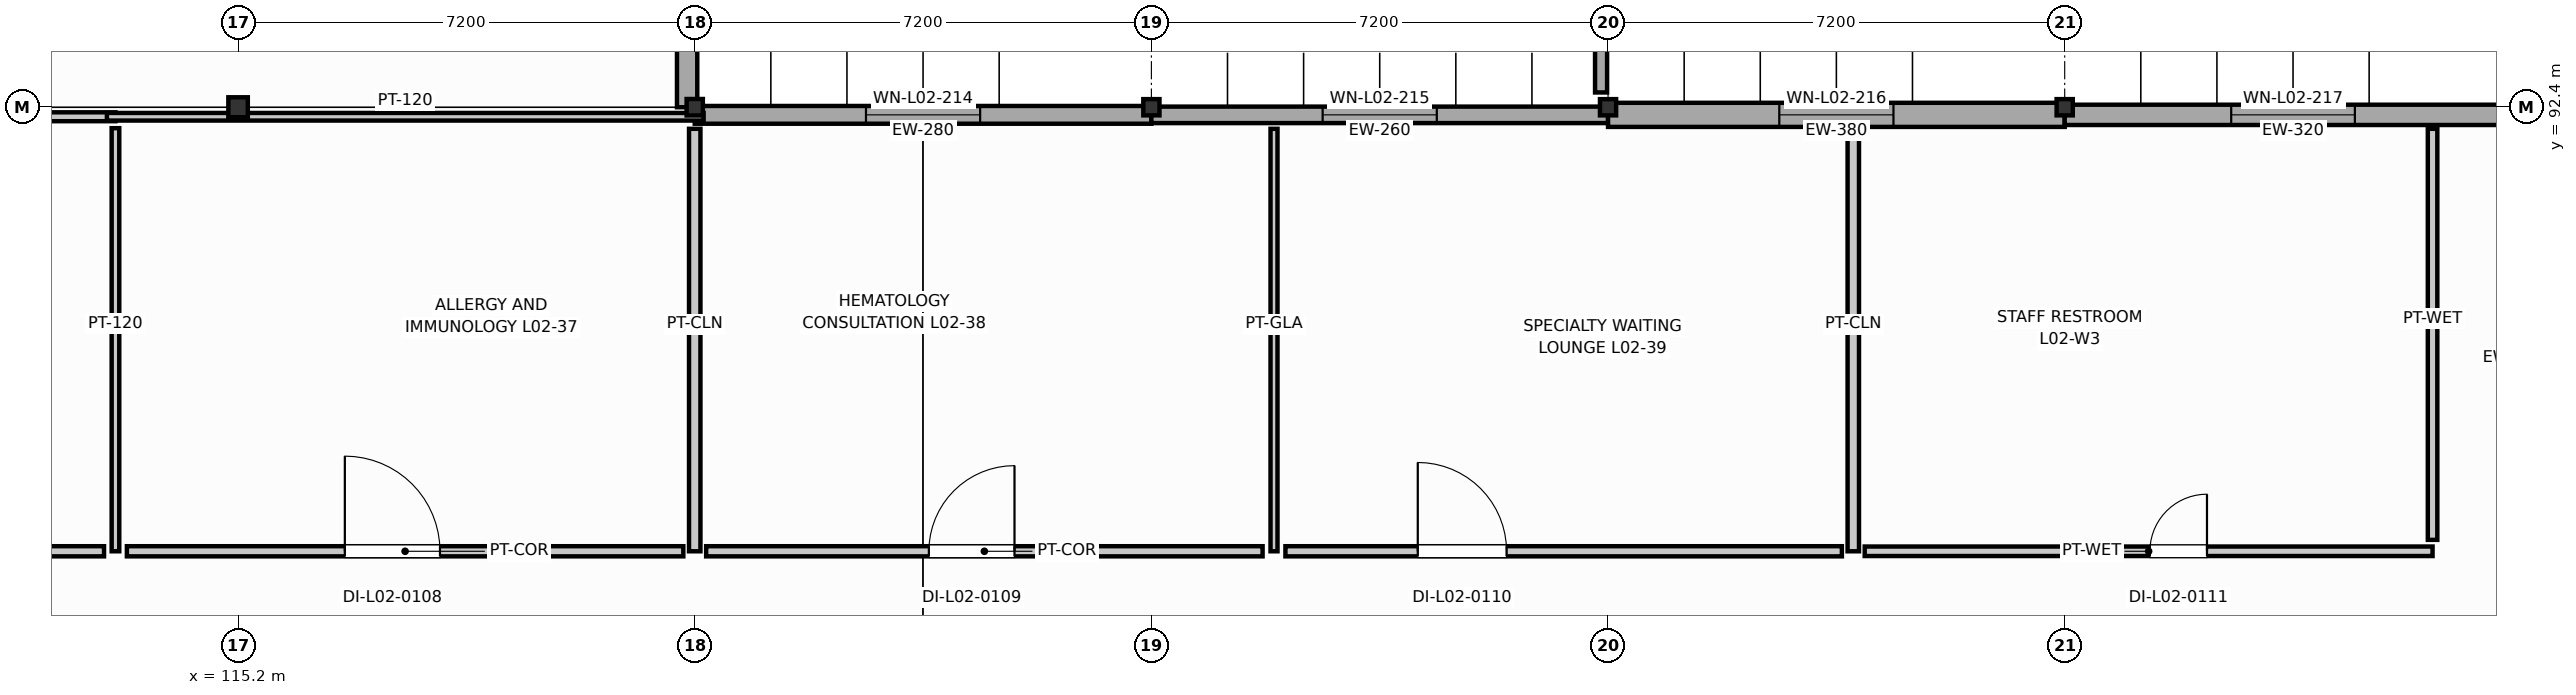
"""IFC4 building model, lengths in metres.
Left out: names, types, materials, properties, quantities, classifications, styles, units other than length and angle.
Written with IfcOpenShell. Run it as: python <this file> out.ifc"""

import sys

from ifc_helpers import new_model, si_unit, direction, frame, frame_2d, origin, origin_2d, place, context, subcontext, project, spatial, rectangle, i_section, extrude, element, fill, save


model = new_model("IFC4")
c1 = context("Model", 3, precision=1e-05, world=origin(), true_north=direction((0.0, 1.0)))
c2 = subcontext(c1, "Body", "Model", "MODEL_VIEW")
j1 = project(units=[si_unit("LENGTHUNIT", "METRE"), si_unit("PLANEANGLEUNIT", "RADIAN")], contexts=[c1])
p1 = place(None, origin())
s1 = spatial("IfcSite", under=j1, at=p1, CompositionType="ELEMENT")
p2 = place(p1, origin())
s2 = spatial("IfcBuilding", under=s1, at=p2, CompositionType="ELEMENT")
p3 = place(p2, frame((0.0, 0.0, 9.0)))
s3 = spatial("IfcBuildingStorey", under=s2, at=p3, CompositionType="ELEMENT", Elevation=9.0)
p4 = place(p3, frame((115.2, 92.4, 0.0), z_axis=(0.0, 0.0, 1.0), x_axis=(1.0, 0.0, 0.0)))
e1 = element("IfcColumn", 1, at=p4, inside=s3, PredefinedType="COLUMN", context=c2, shape_type="SweptSolid", body=[
    extrude(i_section(OverallWidth=0.307, OverallDepth=0.314, WebThickness=0.012, FlangeThickness=0.019, FilletRadius=0.016, at=origin_2d()), origin(), (0.0, 0.0, 1.0), 4.2),
])
p5 = place(p3, frame((122.4, 92.4, 0.0), z_axis=(0.0, 0.0, 1.0), x_axis=(1.0, 0.0, 0.0)))
e2 = element("IfcColumn", 2, at=p5, inside=s3, PredefinedType="COLUMN", context=c2, shape_type="SweptSolid", body=[
    extrude(i_section(OverallWidth=0.256, OverallDepth=0.26, WebThickness=0.011, FlangeThickness=0.017, FilletRadius=0.013, at=origin_2d()), origin(), (0.0, 0.0, 1.0), 4.2),
])
for number, where, z_axis, x_axis in (
    (3, (129.6, 92.4, 0.0), (0.0, 0.0, 1.0), (1.0, 0.0, 0.0)),
    (4, (136.8, 92.4, 0.0), (0.0, 0.0, 1.0), (1.0, 0.0, 0.0)),
    (5, (144.0, 92.4, 0.0), (0.0, 0.0, 1.0), (1.0, 0.0, 0.0)),
):
    element("IfcColumn", number, at=place(p3, frame(where, z_axis=z_axis, x_axis=x_axis)), inside=s3, PredefinedType="COLUMN", context=c2, shape_type="SweptSolid", body=[
        extrude(i_section(OverallWidth=0.255, OverallDepth=0.256, WebThickness=0.01, FlangeThickness=0.016, FilletRadius=0.013, at=origin_2d()), origin(), (0.0, 0.0, 1.0), 4.2),
    ])
p6 = place(p3, frame((122.28, 92.4, 0.0), z_axis=(0.0, 0.0, 1.0), x_axis=(0.0, 1.0, 0.0)))
e6 = element("IfcWall", 6, at=p6, inside=s3, PredefinedType="SOLIDWALL", context=c2, shape_type="SweptSolid", body=[
    extrude(rectangle(XDim=8.4, YDim=0.32, at=frame_2d((4.2, 0.0))), origin(), (0.0, 0.0, 1.0), 3.091),
])
p7 = place(p6, frame((3.375, 0.0, 0.95)))
e7 = element("IfcOpeningElement", 7, at=p7, cuts=e6, PredefinedType="OPENING", context=c2, shape_type="SweptSolid", body=[
    extrude(rectangle(XDim=1.65, YDim=1.75, at=frame_2d((0.825, 0.875))), frame((0.0, 0.17, 0.0), z_axis=(0.0, -1.0, 0.0), x_axis=(1.0, 0.0, 0.0)), (0.0, 0.0, 1.0), 0.34),
])
p8 = place(p3, frame((122.4, 92.28, 0.0), z_axis=(0.0, 0.0, 1.0), x_axis=(1.0, 0.0, 0.0)))
e8 = element("IfcWall", 8, at=p8, inside=s3, PredefinedType="SOLIDWALL", context=c2, shape_type="SweptSolid", body=[
    extrude(rectangle(XDim=7.2, YDim=0.28, at=frame_2d((3.6, 0.0))), origin(), (0.0, 0.0, 1.0), 3.249),
])
p9 = place(p8, frame((2.7, 0.0, 0.95)))
e9 = element("IfcOpeningElement", 9, at=p9, cuts=e8, PredefinedType="OPENING", context=c2, shape_type="SweptSolid", body=[
    extrude(rectangle(XDim=1.8, YDim=1.35, at=frame_2d((0.9, 0.675))), frame((0.0, 0.15, 0.0), z_axis=(0.0, -1.0, 0.0), x_axis=(1.0, 0.0, 0.0)), (0.0, 0.0, 1.0), 0.3),
])
p10 = place(p3, frame((129.6, 92.28, 0.0), z_axis=(0.0, 0.0, 1.0), x_axis=(1.0, 0.0, 0.0)))
e10 = element("IfcWall", 10, at=p10, inside=s3, PredefinedType="SOLIDWALL", context=c2, shape_type="SweptSolid", body=[
    extrude(rectangle(XDim=7.2, YDim=0.26, at=frame_2d((3.6, 0.0))), origin(), (0.0, 0.0, 1.0), 3.249),
])
p11 = place(p10, frame((2.7, 0.0, 0.95)))
e11 = element("IfcOpeningElement", 11, at=p11, cuts=e10, PredefinedType="OPENING", context=c2, shape_type="SweptSolid", body=[
    extrude(rectangle(XDim=1.8, YDim=1.55, at=frame_2d((0.9, 0.775))), frame((0.0, 0.14, 0.0), z_axis=(0.0, -1.0, 0.0), x_axis=(1.0, 0.0, 0.0)), (0.0, 0.0, 1.0), 0.28),
])
p12 = place(p3, frame((136.8, 92.28, 0.0), z_axis=(0.0, 0.0, 1.0), x_axis=(1.0, 0.0, 0.0)))
e12 = element("IfcWall", 12, at=p12, inside=s3, PredefinedType="SOLIDWALL", context=c2, shape_type="SweptSolid", body=[
    extrude(rectangle(XDim=7.2, YDim=0.38, at=frame_2d((3.6, 0.0))), origin(), (0.0, 0.0, 1.0), 3.249),
])
p13 = place(p12, frame((2.7, 0.0, 0.95)))
e13 = element("IfcOpeningElement", 13, at=p13, cuts=e12, PredefinedType="OPENING", context=c2, shape_type="SweptSolid", body=[
    extrude(rectangle(XDim=1.8, YDim=1.75, at=frame_2d((0.9, 0.875))), frame((0.0, 0.2, 0.0), z_axis=(0.0, -1.0, 0.0), x_axis=(1.0, 0.0, 0.0)), (0.0, 0.0, 1.0), 0.4),
])
p14 = place(p3, frame((144.0, 92.28, 0.0), z_axis=(0.0, 0.0, 1.0), x_axis=(1.0, 0.0, 0.0)))
e14 = element("IfcWall", 14, at=p14, inside=s3, PredefinedType="SOLIDWALL", context=c2, shape_type="SweptSolid", body=[
    extrude(rectangle(XDim=7.2, YDim=0.32, at=frame_2d((3.6, 0.0))), origin(), (0.0, 0.0, 1.0), 3.254),
])
p15 = place(p14, frame((2.625, 0.0, 0.95)))
e15 = element("IfcOpeningElement", 15, at=p15, cuts=e14, PredefinedType="OPENING", context=c2, shape_type="SweptSolid", body=[
    extrude(rectangle(XDim=1.95, YDim=1.15, at=frame_2d((0.975, 0.575))), frame((0.0, 0.17, 0.0), z_axis=(0.0, -1.0, 0.0), x_axis=(1.0, 0.0, 0.0)), (0.0, 0.0, 1.0), 0.34),
])
p16 = place(p3, frame((136.69, 108.98, 0.0), z_axis=(0.0, 0.0, 1.0), x_axis=(0.0, -1.0, 0.0)))
e16 = element("IfcWall", 16, at=p16, inside=s3, PredefinedType="PARAPET", context=c2, shape_type="SweptSolid", body=[
    extrude(rectangle(XDim=16.347, YDim=0.19, at=frame_2d((8.173, 0.0))), origin(), (0.0, 0.0, 1.0), 1.15),
])
p17 = place(p3, frame((103.998, 92.25, 0.0), z_axis=(0.0, 0.0, 1.0), x_axis=(1.0, 0.0, 0.0)))
e17 = element("IfcWall", 17, at=p17, inside=s3, PredefinedType="PARTITIONING", context=c2, shape_type="SweptSolid", body=[
    extrude(rectangle(XDim=9.268, YDim=0.14, at=frame_2d((4.634, 0.0))), origin(), (0.0, 0.0, 1.0), 3.175),
])
p18 = place(p3, frame((113.267, 92.07, 0.0), z_axis=(0.0, 0.0, 1.0), x_axis=(0.0, -1.0, 0.0)))
e18 = element("IfcWall", 18, at=p18, inside=s3, PredefinedType="PARTITIONING", context=c2, shape_type="SweptSolid", body=[
    extrude(rectangle(XDim=6.67, YDim=0.12, at=frame_2d((3.335, 0.0))), origin(), (0.0, 0.0, 1.0), 3.945),
])
p19 = place(p3, frame((113.087, 85.4, 0.0), z_axis=(0.0, 0.0, 1.0), x_axis=(-1.0, 0.0, 0.0)))
e19 = element("IfcWall", 19, at=p19, inside=s3, PredefinedType="PARTITIONING", context=c2, shape_type="SweptSolid", body=[
    extrude(rectangle(XDim=8.773, YDim=0.16, at=frame_2d((4.387, 0.0))), origin(), (0.0, 0.0, 1.0), 3.175),
])
p20 = place(p19, frame((3.012, 0.0, 0.0)))
e20 = element("IfcOpeningElement", 20, at=p20, cuts=e19, PredefinedType="OPENING", context=c2, shape_type="SweptSolid", body=[
    extrude(rectangle(XDim=1.15, YDim=2.15, at=frame_2d((0.575, 1.075))), frame((0.0, 0.09, 0.0), z_axis=(0.0, -1.0, 0.0), x_axis=(1.0, 0.0, 0.0)), (0.0, 0.0, 1.0), 0.18),
])
p21 = place(p3, frame((113.132, 92.25, 0.0), z_axis=(0.0, 0.0, 1.0), x_axis=(1.0, 0.0, 0.0)))
e21 = element("IfcWall", 21, at=p21, inside=s3, PredefinedType="PARTITIONING", context=c2, shape_type="SweptSolid", body=[
    extrude(rectangle(XDim=9.408, YDim=0.12, at=frame_2d((4.704, 0.0))), origin(), (0.0, 0.0, 1.0), 3.094),
])
p22 = place(p3, frame((122.4, 92.06, 0.0), z_axis=(0.0, 0.0, 1.0), x_axis=(0.0, -1.0, 0.0)))
e22 = element("IfcWall", 22, at=p22, inside=s3, PredefinedType="PARTITIONING", context=c2, shape_type="SweptSolid", body=[
    extrude(rectangle(XDim=6.66, YDim=0.18, at=frame_2d((3.33, 0.0))), origin(), (0.0, 0.0, 1.0), 3.535),
])
p23 = place(p3, frame((122.22, 85.4, 0.0), z_axis=(0.0, 0.0, 1.0), x_axis=(-1.0, 0.0, 0.0)))
e23 = element("IfcWall", 23, at=p23, inside=s3, PredefinedType="PARTITIONING", context=c2, shape_type="SweptSolid", body=[
    extrude(rectangle(XDim=8.773, YDim=0.16, at=frame_2d((4.387, 0.0))), origin(), (0.0, 0.0, 1.0), 3.408),
])
p24 = place(p23, frame((3.837, 0.0, 0.0)))
e24 = element("IfcOpeningElement", 24, at=p24, cuts=e23, PredefinedType="OPENING", context=c2, shape_type="SweptSolid", body=[
    extrude(rectangle(XDim=1.5, YDim=2.2, at=frame_2d((0.75, 1.1))), frame((0.0, 0.09, 0.0), z_axis=(0.0, -1.0, 0.0), x_axis=(1.0, 0.0, 0.0)), (0.0, 0.0, 1.0), 0.18),
])
p25 = place(p3, frame((131.533, 92.06, 0.0), z_axis=(0.0, 0.0, 1.0), x_axis=(0.0, -1.0, 0.0)))
e25 = element("IfcWall", 25, at=p25, inside=s3, PredefinedType="MOVABLE", context=c2, shape_type="SweptSolid", body=[
    extrude(rectangle(XDim=6.66, YDim=0.11, at=frame_2d((3.33, 0.0))), origin(), (0.0, 0.0, 1.0), 3.945),
])
p26 = place(p3, frame((131.353, 85.4, 0.0), z_axis=(0.0, 0.0, 1.0), x_axis=(-1.0, 0.0, 0.0)))
e26 = element("IfcWall", 26, at=p26, inside=s3, PredefinedType="PARTITIONING", context=c2, shape_type="SweptSolid", body=[
    extrude(rectangle(XDim=8.773, YDim=0.16, at=frame_2d((4.387, 0.0))), origin(), (0.0, 0.0, 1.0), 3.328),
])
p27 = place(p26, frame((3.912, 0.0, 0.0)))
e27 = element("IfcOpeningElement", 27, at=p27, cuts=e26, PredefinedType="OPENING", context=c2, shape_type="SweptSolid", body=[
    extrude(rectangle(XDim=1.35, YDim=2.15, at=frame_2d((0.675, 1.075))), frame((0.0, 0.09, 0.0), z_axis=(0.0, -1.0, 0.0), x_axis=(1.0, 0.0, 0.0)), (0.0, 0.0, 1.0), 0.18),
])
p28 = place(p3, frame((140.667, 92.06, 0.0), z_axis=(0.0, 0.0, 1.0), x_axis=(0.0, -1.0, 0.0)))
e28 = element("IfcWall", 28, at=p28, inside=s3, PredefinedType="PARTITIONING", context=c2, shape_type="SweptSolid", body=[
    extrude(rectangle(XDim=6.66, YDim=0.18, at=frame_2d((3.33, 0.0))), origin(), (0.0, 0.0, 1.0), 3.945),
])
p29 = place(p3, frame((140.487, 85.4, 0.0), z_axis=(0.0, 0.0, 1.0), x_axis=(-1.0, 0.0, 0.0)))
e29 = element("IfcWall", 29, at=p29, inside=s3, PredefinedType="PARTITIONING", context=c2, shape_type="SweptSolid", body=[
    extrude(rectangle(XDim=8.773, YDim=0.16, at=frame_2d((4.387, 0.0))), origin(), (0.0, 0.0, 1.0), 3.408),
])
p30 = place(p29, frame((5.287, 0.0, 0.0)))
e30 = element("IfcOpeningElement", 30, at=p30, cuts=e29, PredefinedType="OPENING", context=c2, shape_type="SweptSolid", body=[
    extrude(rectangle(XDim=1.4, YDim=2.2, at=frame_2d((0.7, 1.1))), frame((0.0, 0.09, 0.0), z_axis=(0.0, -1.0, 0.0), x_axis=(1.0, 0.0, 0.0)), (0.0, 0.0, 1.0), 0.18),
])
p31 = place(p3, frame((149.8, 85.4, 0.0), z_axis=(0.0, 0.0, 1.0), x_axis=(-1.0, 0.0, 0.0)))
e31 = element("IfcWall", 31, at=p31, inside=s3, PredefinedType="PLUMBINGWALL", context=c2, shape_type="SweptSolid", body=[
    extrude(rectangle(XDim=8.953, YDim=0.15, at=frame_2d((4.477, 0.0))), origin(), (0.0, 0.0, 1.0), 3.252),
])
p32 = place(p31, frame((3.557, 0.0, 0.0)))
e32 = element("IfcOpeningElement", 32, at=p32, cuts=e31, PredefinedType="OPENING", context=c2, shape_type="SweptSolid", body=[
    extrude(rectangle(XDim=0.9, YDim=2.1, at=frame_2d((0.45, 1.05))), frame((0.0, 0.085, 0.0), z_axis=(0.0, -1.0, 0.0), x_axis=(1.0, 0.0, 0.0)), (0.0, 0.0, 1.0), 0.17),
])
p33 = place(p3, frame((149.8, 92.06, 0.0), z_axis=(0.0, 0.0, 1.0), x_axis=(0.0, -1.0, 0.0)))
e33 = element("IfcWall", 33, at=p33, inside=s3, PredefinedType="PLUMBINGWALL", context=c2, shape_type="SweptSolid", body=[
    extrude(rectangle(XDim=6.48, YDim=0.15, at=frame_2d((3.24, 0.0))), origin(), (0.0, 0.0, 1.0), 3.945),
])
p34 = place(p9, origin())
e34 = element("IfcWindow", 34, at=p34, inside=s3, PartitioningType="SINGLE_PANEL", PredefinedType="WINDOW", context=c2, shape_type="SweptSolid", body=[
    extrude(rectangle(XDim=1.8, YDim=1.35, at=frame_2d((0.9, 0.675))), frame((0.0, 0.03, 0.0), z_axis=(0.0, -1.0, 0.0), x_axis=(1.0, 0.0, 0.0)), (0.0, 0.0, 1.0), 0.06),
])
fill(e9, e34)
p35 = place(p11, origin())
e35 = element("IfcWindow", 35, at=p35, inside=s3, PartitioningType="SINGLE_PANEL", PredefinedType="WINDOW", context=c2, shape_type="SweptSolid", body=[
    extrude(rectangle(XDim=1.8, YDim=1.55, at=frame_2d((0.9, 0.775))), frame((0.0, 0.03, 0.0), z_axis=(0.0, -1.0, 0.0), x_axis=(1.0, 0.0, 0.0)), (0.0, 0.0, 1.0), 0.06),
])
fill(e11, e35)
p36 = place(p13, origin())
e36 = element("IfcWindow", 36, at=p36, inside=s3, PartitioningType="SINGLE_PANEL", PredefinedType="WINDOW", context=c2, shape_type="SweptSolid", body=[
    extrude(rectangle(XDim=1.8, YDim=1.75, at=frame_2d((0.9, 0.875))), frame((0.0, 0.03, 0.0), z_axis=(0.0, -1.0, 0.0), x_axis=(1.0, 0.0, 0.0)), (0.0, 0.0, 1.0), 0.06),
])
fill(e13, e36)
p37 = place(p15, origin())
e37 = element("IfcWindow", 37, at=p37, inside=s3, PartitioningType="SINGLE_PANEL", PredefinedType="WINDOW", context=c2, shape_type="SweptSolid", body=[
    extrude(rectangle(XDim=1.95, YDim=1.15, at=frame_2d((0.975, 0.575))), frame((0.0, 0.03, 0.0), z_axis=(0.0, -1.0, 0.0), x_axis=(1.0, 0.0, 0.0)), (0.0, 0.0, 1.0), 0.06),
])
fill(e15, e37)
p38 = place(p24, frame((1.5, 0.0, 0.0), z_axis=(0.0, 0.0, 1.0), x_axis=(-1.0, 0.0, 0.0)))
e38 = element("IfcDoor", 38, at=p38, inside=s3, OperationType="SINGLE_SWING_LEFT", PredefinedType="DOOR", context=c2, shape_type="SweptSolid", body=[
    extrude(rectangle(XDim=1.5, YDim=2.2, at=frame_2d((0.75, 1.1))), frame((0.0, 0.025, 0.0), z_axis=(0.0, -1.0, 0.0), x_axis=(1.0, 0.0, 0.0)), (0.0, 0.0, 1.0), 0.05),
])
fill(e24, e38)
p39 = place(p27, frame((1.35, 0.0, 0.0), z_axis=(0.0, 0.0, 1.0), x_axis=(-1.0, 0.0, 0.0)))
e39 = element("IfcDoor", 39, at=p39, inside=s3, OperationType="SINGLE_SWING_RIGHT", PredefinedType="DOOR", context=c2, shape_type="SweptSolid", body=[
    extrude(rectangle(XDim=1.35, YDim=2.15, at=frame_2d((0.675, 1.075))), frame((0.0, 0.025, 0.0), z_axis=(0.0, -1.0, 0.0), x_axis=(1.0, 0.0, 0.0)), (0.0, 0.0, 1.0), 0.05),
])
fill(e27, e39)
p40 = place(p30, frame((1.4, 0.0, 0.0), z_axis=(0.0, 0.0, 1.0), x_axis=(-1.0, 0.0, 0.0)))
e40 = element("IfcDoor", 40, at=p40, inside=s3, OperationType="SINGLE_SWING_LEFT", PredefinedType="DOOR", context=c2, shape_type="SweptSolid", body=[
    extrude(rectangle(XDim=1.4, YDim=2.2, at=frame_2d((0.7, 1.1))), frame((0.0, 0.025, 0.0), z_axis=(0.0, -1.0, 0.0), x_axis=(1.0, 0.0, 0.0)), (0.0, 0.0, 1.0), 0.05),
])
fill(e30, e40)
p41 = place(p32, frame((0.9, 0.0, 0.0), z_axis=(0.0, 0.0, 1.0), x_axis=(-1.0, 0.0, 0.0)))
e41 = element("IfcDoor", 41, at=p41, inside=s3, OperationType="SINGLE_SWING_RIGHT", PredefinedType="DOOR", context=c2, shape_type="SweptSolid", body=[
    extrude(rectangle(XDim=0.9, YDim=2.1, at=frame_2d((0.45, 1.05))), frame((0.0, 0.025, 0.0), z_axis=(0.0, -1.0, 0.0), x_axis=(1.0, 0.0, 0.0)), (0.0, 0.0, 1.0), 0.05),
])
fill(e32, e41)
save(model, sys.argv[1])
